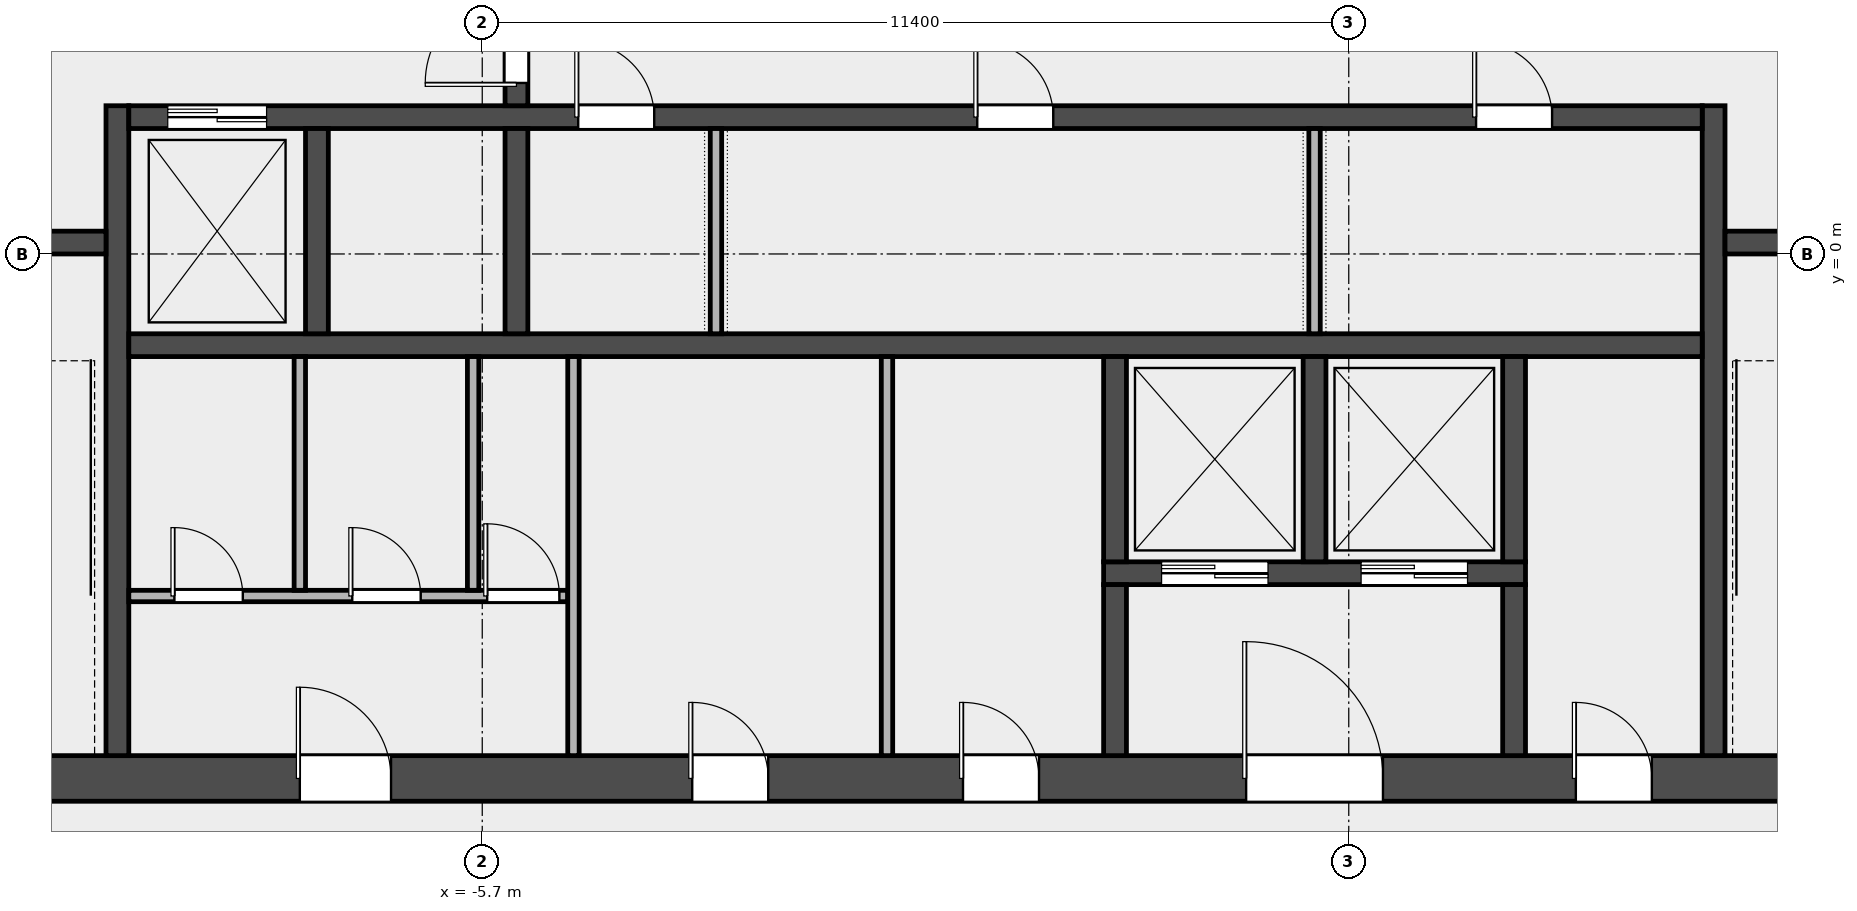
"""IFC4 building model, lengths in metres.
Left out: names, types, materials, properties, quantities, classifications, styles, units other than length and angle.
Written with IfcOpenShell. Run it as: python <this file> out.ifc"""

import sys

from ifc_helpers import new_model, si_unit, direction, frame, frame_2d, origin, place, context, subcontext, project, spatial, rectangle, extrude, element, fill, save


model = new_model("IFC4")
c1 = context("Model", 3, precision=1e-05, world=origin(), true_north=direction((0.0, 1.0)))
c2 = subcontext(c1, "Body", "Model", "MODEL_VIEW")
j1 = project(units=[si_unit("LENGTHUNIT", "METRE"), si_unit("PLANEANGLEUNIT", "RADIAN")], contexts=[c1])
p1 = place(None, origin())
s1 = spatial("IfcSite", under=j1, at=p1, CompositionType="ELEMENT")
p2 = place(p1, origin())
s2 = spatial("IfcBuilding", under=s1, at=p2, CompositionType="ELEMENT")
p3 = place(p2, frame((0.0, 0.0, 287.4)))
s3 = spatial("IfcBuildingStorey", under=s2, at=p3, CompositionType="ELEMENT", Elevation=287.4)
p4 = place(p3, frame((-14.4, -6.9, 0.0), z_axis=(0.0, 0.0, 1.0), x_axis=(1.0, 0.0, 0.0)))
e1 = element("IfcWall", 1, at=p4, inside=s3, PredefinedType="SHEAR", context=c2, shape_type="SweptSolid", body=[
    extrude(rectangle(XDim=28.8, YDim=0.6, at=frame_2d((14.4, 0.0))), origin(), (0.0, 0.0, 1.0), 3.7),
])
p5 = place(p4, frame((6.3, 0.0, 0.0)))
e2 = element("IfcOpeningElement", 2, at=p5, cuts=e1, PredefinedType="OPENING", context=c2, shape_type="SweptSolid", body=[
    extrude(rectangle(XDim=1.2, YDim=2.1, at=frame_2d((0.6, 1.05))), frame((0.0, 0.312, 0.0), z_axis=(0.0, -1.0, 0.0), x_axis=(1.0, 0.0, 0.0)), (0.0, 0.0, 1.0), 0.624),
])
p6 = place(p4, frame((11.462, 0.0, 0.0)))
e3 = element("IfcOpeningElement", 3, at=p6, cuts=e1, PredefinedType="OPENING", context=c2, shape_type="SweptSolid", body=[
    extrude(rectangle(XDim=1.0, YDim=2.1, at=frame_2d((0.5, 1.05))), frame((0.0, 0.312, 0.0), z_axis=(0.0, -1.0, 0.0), x_axis=(1.0, 0.0, 0.0)), (0.0, 0.0, 1.0), 0.624),
])
p7 = place(p4, frame((15.025, 0.0, 0.0)))
e4 = element("IfcOpeningElement", 4, at=p7, cuts=e1, PredefinedType="OPENING", context=c2, shape_type="SweptSolid", body=[
    extrude(rectangle(XDim=1.0, YDim=2.1, at=frame_2d((0.5, 1.05))), frame((0.0, 0.312, 0.0), z_axis=(0.0, -1.0, 0.0), x_axis=(1.0, 0.0, 0.0)), (0.0, 0.0, 1.0), 0.624),
])
p8 = place(p4, frame((18.75, 0.0, 0.0)))
e5 = element("IfcOpeningElement", 5, at=p8, cuts=e1, PredefinedType="OPENING", context=c2, shape_type="SweptSolid", body=[
    extrude(rectangle(XDim=1.8, YDim=2.1, at=frame_2d((0.9, 1.05))), frame((0.0, 0.312, 0.0), z_axis=(0.0, -1.0, 0.0), x_axis=(1.0, 0.0, 0.0)), (0.0, 0.0, 1.0), 0.624),
])
p9 = place(p4, frame((23.087, 0.0, 0.0)))
e6 = element("IfcOpeningElement", 6, at=p9, cuts=e1, PredefinedType="OPENING", context=c2, shape_type="SweptSolid", body=[
    extrude(rectangle(XDim=1.0, YDim=2.1, at=frame_2d((0.5, 1.05))), frame((0.0, 0.312, 0.0), z_axis=(0.0, -1.0, 0.0), x_axis=(1.0, 0.0, 0.0)), (0.0, 0.0, 1.0), 0.624),
])
for number, where, z_axis, x_axis in (
    (7, (-10.5, -6.6, 0.0), (0.0, 0.0, 1.0), (0.0, 1.0, 0.0)),
    (8, (10.5, -6.6, 0.0), (0.0, 0.0, 1.0), (0.0, 1.0, 0.0)),
):
    element("IfcWall", number, at=place(p3, frame(where, z_axis=z_axis, x_axis=x_axis)), inside=s3, PredefinedType="SHEAR", context=c2, shape_type="SweptSolid", body=[
        extrude(rectangle(XDim=8.55, YDim=0.3, at=frame_2d((4.275, 0.0))), origin(), (0.0, 0.0, 1.0), 3.7),
    ])
p10 = place(p3, frame((-13.8, 0.15, 0.0), z_axis=(0.0, 0.0, 1.0), x_axis=(1.0, 0.0, 0.0)))
e9 = element("IfcWall", 9, at=p10, inside=s3, PredefinedType="SOLIDWALL", context=c2, shape_type="SweptSolid", body=[
    extrude(rectangle(XDim=3.15, YDim=0.3, at=frame_2d((1.575, 0.0))), origin(), (0.0, 0.0, 1.0), 3.7),
])
p11 = place(p10, frame((0.975, 0.0, 0.0)))
e10 = element("IfcOpeningElement", 10, at=p11, cuts=e9, PredefinedType="OPENING", context=c2, shape_type="SweptSolid", body=[
    extrude(rectangle(XDim=1.1, YDim=2.1, at=frame_2d((0.55, 1.05))), frame((0.0, 0.162, 0.0), z_axis=(0.0, -1.0, 0.0), x_axis=(1.0, 0.0, 0.0)), (0.0, 0.0, 1.0), 0.324),
])
p12 = place(p3, frame((10.65, 0.15, 0.0), z_axis=(0.0, 0.0, 1.0), x_axis=(1.0, 0.0, 0.0)))
e11 = element("IfcWall", 11, at=p12, inside=s3, PredefinedType="SOLIDWALL", context=c2, shape_type="SweptSolid", body=[
    extrude(rectangle(XDim=3.15, YDim=0.3, at=frame_2d((1.575, 0.0))), origin(), (0.0, 0.0, 1.0), 3.7),
])
p13 = place(p12, frame((1.025, 0.0, 0.0)))
e12 = element("IfcOpeningElement", 12, at=p13, cuts=e11, PredefinedType="OPENING", context=c2, shape_type="SweptSolid", body=[
    extrude(rectangle(XDim=1.1, YDim=2.1, at=frame_2d((0.55, 1.05))), frame((0.0, 0.162, 0.0), z_axis=(0.0, -1.0, 0.0), x_axis=(1.0, 0.0, 0.0)), (0.0, 0.0, 1.0), 0.324),
])
p14 = place(p3, frame((-10.35, -1.2, 0.0), z_axis=(0.0, 0.0, 1.0), x_axis=(1.0, 0.0, 0.0)))
e13 = element("IfcWall", 13, at=p14, inside=s3, PredefinedType="SOLIDWALL", context=c2, shape_type="SweptSolid", body=[
    extrude(rectangle(XDim=20.7, YDim=0.3, at=frame_2d((10.35, 0.0))), origin(), (0.0, 0.0, 1.0), 3.7),
])
p15 = place(p3, frame((-10.35, 1.8, 0.0), z_axis=(0.0, 0.0, 1.0), x_axis=(1.0, 0.0, 0.0)))
e14 = element("IfcWall", 14, at=p15, inside=s3, PredefinedType="SOLIDWALL", context=c2, shape_type="SweptSolid", body=[
    extrude(rectangle(XDim=20.7, YDim=0.3, at=frame_2d((10.35, 0.0))), origin(), (0.0, 0.0, 1.0), 3.7),
])
p16 = place(p15, frame((0.512, 0.0, 0.0)))
e15 = element("IfcOpeningElement", 15, at=p16, cuts=e14, PredefinedType="OPENING", context=c2, shape_type="SweptSolid", body=[
    extrude(rectangle(XDim=1.3, YDim=2.1, at=frame_2d((0.65, 1.05))), frame((0.0, 0.162, 0.0), z_axis=(0.0, -1.0, 0.0), x_axis=(1.0, 0.0, 0.0)), (0.0, 0.0, 1.0), 0.324),
])
p17 = place(p15, frame((5.913, 0.0, 0.0)))
e16 = element("IfcOpeningElement", 16, at=p17, cuts=e14, PredefinedType="OPENING", context=c2, shape_type="SweptSolid", body=[
    extrude(rectangle(XDim=1.0, YDim=2.1, at=frame_2d((0.5, 1.05))), frame((0.0, 0.162, 0.0), z_axis=(0.0, -1.0, 0.0), x_axis=(1.0, 0.0, 0.0)), (0.0, 0.0, 1.0), 0.324),
])
p18 = place(p15, frame((11.163, 0.0, 0.0)))
e17 = element("IfcOpeningElement", 17, at=p18, cuts=e14, PredefinedType="OPENING", context=c2, shape_type="SweptSolid", body=[
    extrude(rectangle(XDim=1.0, YDim=2.1, at=frame_2d((0.5, 1.05))), frame((0.0, 0.162, 0.0), z_axis=(0.0, -1.0, 0.0), x_axis=(1.0, 0.0, 0.0)), (0.0, 0.0, 1.0), 0.324),
])
p19 = place(p15, frame((17.725, 0.0, 0.0)))
e18 = element("IfcOpeningElement", 18, at=p19, cuts=e14, PredefinedType="OPENING", context=c2, shape_type="SweptSolid", body=[
    extrude(rectangle(XDim=1.0, YDim=2.1, at=frame_2d((0.5, 1.05))), frame((0.0, 0.162, 0.0), z_axis=(0.0, -1.0, 0.0), x_axis=(1.0, 0.0, 0.0)), (0.0, 0.0, 1.0), 0.324),
])
for number, where, z_axis, x_axis in (
    (19, (-7.875, -1.05, 0.0), (0.0, 0.0, 1.0), (0.0, 1.0, 0.0)),
    (20, (-5.25, -1.05, 0.0), (0.0, 0.0, 1.0), (0.0, 1.0, 0.0)),
):
    element("IfcWall", number, at=place(p3, frame(where, z_axis=z_axis, x_axis=x_axis)), inside=s3, PredefinedType="SOLIDWALL", context=c2, shape_type="SweptSolid", body=[
        extrude(rectangle(XDim=2.7, YDim=0.3, at=frame_2d((1.35, 0.0))), origin(), (0.0, 0.0, 1.0), 3.7),
    ])
p20 = place(p3, frame((-5.25, 1.95, 0.0), z_axis=(0.0, 0.0, 1.0), x_axis=(0.0, 1.0, 0.0)))
e21 = element("IfcWall", 21, at=p20, inside=s3, PredefinedType="SOLIDWALL", context=c2, shape_type="SweptSolid", body=[
    extrude(rectangle(XDim=3.3, YDim=0.3, at=frame_2d((1.65, 0.0))), origin(), (0.0, 0.0, 1.0), 3.7),
])
p21 = place(p20, frame((0.3, 0.0, 0.0)))
e22 = element("IfcOpeningElement", 22, at=p21, cuts=e21, PredefinedType="OPENING", context=c2, shape_type="SweptSolid", body=[
    extrude(rectangle(XDim=1.2, YDim=2.1, at=frame_2d((0.6, 1.05))), frame((0.0, 0.162, 0.0), z_axis=(0.0, -1.0, 0.0), x_axis=(1.0, 0.0, 0.0)), (0.0, 0.0, 1.0), 0.324),
])
p22 = place(p20, frame((1.8, 0.0, 0.0)))
e23 = element("IfcOpeningElement", 23, at=p22, cuts=e21, PredefinedType="OPENING", context=c2, shape_type="SweptSolid", body=[
    extrude(rectangle(XDim=1.2, YDim=2.1, at=frame_2d((0.6, 1.05))), frame((0.0, 0.162, 0.0), z_axis=(0.0, -1.0, 0.0), x_axis=(1.0, 0.0, 0.0)), (0.0, 0.0, 1.0), 0.324),
])
p23 = place(p3, frame((2.475, -4.2, 0.0), z_axis=(0.0, 0.0, 1.0), x_axis=(1.0, 0.0, 0.0)))
e24 = element("IfcWall", 24, at=p23, inside=s3, PredefinedType="SOLIDWALL", context=c2, shape_type="SweptSolid", body=[
    extrude(rectangle(XDim=5.55, YDim=0.3, at=frame_2d((2.775, 0.0))), origin(), (0.0, 0.0, 1.0), 3.7),
])
p24 = place(p23, frame((0.762, 0.0, 0.0)))
e25 = element("IfcOpeningElement", 25, at=p24, cuts=e24, PredefinedType="OPENING", context=c2, shape_type="SweptSolid", body=[
    extrude(rectangle(XDim=1.4, YDim=2.1, at=frame_2d((0.7, 1.05))), frame((0.0, 0.162, 0.0), z_axis=(0.0, -1.0, 0.0), x_axis=(1.0, 0.0, 0.0)), (0.0, 0.0, 1.0), 0.324),
])
p25 = place(p23, frame((3.387, 0.0, 0.0)))
e26 = element("IfcOpeningElement", 26, at=p25, cuts=e24, PredefinedType="OPENING", context=c2, shape_type="SweptSolid", body=[
    extrude(rectangle(XDim=1.4, YDim=2.1, at=frame_2d((0.7, 1.05))), frame((0.0, 0.162, 0.0), z_axis=(0.0, -1.0, 0.0), x_axis=(1.0, 0.0, 0.0)), (0.0, 0.0, 1.0), 0.324),
])
p26 = place(p3, frame((2.625, -4.05, 0.0), z_axis=(0.0, 0.0, 1.0), x_axis=(0.0, 1.0, 0.0)))
e27 = element("IfcWall", 27, at=p26, inside=s3, PredefinedType="SOLIDWALL", context=c2, shape_type="SweptSolid", body=[
    extrude(rectangle(XDim=2.7, YDim=0.3, at=frame_2d((1.35, 0.0))), origin(), (0.0, 0.0, 1.0), 3.7),
])
p27 = place(p3, frame((2.625, -6.6, 0.0), z_axis=(0.0, 0.0, 1.0), x_axis=(0.0, 1.0, 0.0)))
e28 = element("IfcWall", 28, at=p27, inside=s3, PredefinedType="SOLIDWALL", context=c2, shape_type="SweptSolid", body=[
    extrude(rectangle(XDim=2.25, YDim=0.3, at=frame_2d((1.125, 0.0))), origin(), (0.0, 0.0, 1.0), 3.7),
])
for number, where, z_axis, x_axis in (
    (29, (5.25, -4.05, 0.0), (0.0, 0.0, 1.0), (0.0, 1.0, 0.0)),
    (30, (7.875, -4.05, 0.0), (0.0, 0.0, 1.0), (0.0, 1.0, 0.0)),
):
    element("IfcWall", number, at=place(p3, frame(where, z_axis=z_axis, x_axis=x_axis)), inside=s3, PredefinedType="SOLIDWALL", context=c2, shape_type="SweptSolid", body=[
        extrude(rectangle(XDim=2.7, YDim=0.3, at=frame_2d((1.35, 0.0))), origin(), (0.0, 0.0, 1.0), 3.7),
    ])
p28 = place(p3, frame((7.875, -6.6, 0.0), z_axis=(0.0, 0.0, 1.0), x_axis=(0.0, 1.0, 0.0)))
e31 = element("IfcWall", 31, at=p28, inside=s3, PredefinedType="SOLIDWALL", context=c2, shape_type="SweptSolid", body=[
    extrude(rectangle(XDim=2.25, YDim=0.3, at=frame_2d((1.125, 0.0))), origin(), (0.0, 0.0, 1.0), 3.7),
])
p29 = place(p3, frame((-10.35, -4.5, 0.0), z_axis=(0.0, 0.0, 1.0), x_axis=(1.0, 0.0, 0.0)))
e32 = element("IfcWall", 32, at=p29, inside=s3, PredefinedType="PARTITIONING", context=c2, shape_type="SweptSolid", body=[
    extrude(rectangle(XDim=5.775, YDim=0.15, at=frame_2d((2.888, 0.0))), origin(), (0.0, 0.0, 1.0), 3.7),
])
p30 = place(p29, frame((0.6, 0.0, 0.0)))
e33 = element("IfcOpeningElement", 33, at=p30, cuts=e32, PredefinedType="OPENING", context=c2, shape_type="SweptSolid", body=[
    extrude(rectangle(XDim=0.9, YDim=2.1, at=frame_2d((0.45, 1.05))), frame((0.0, 0.087, 0.0), z_axis=(0.0, -1.0, 0.0), x_axis=(1.0, 0.0, 0.0)), (0.0, 0.0, 1.0), 0.174),
])
p31 = place(p29, frame((2.94, 0.0, 0.0)))
e34 = element("IfcOpeningElement", 34, at=p31, cuts=e32, PredefinedType="OPENING", context=c2, shape_type="SweptSolid", body=[
    extrude(rectangle(XDim=0.9, YDim=2.1, at=frame_2d((0.45, 1.05))), frame((0.0, 0.087, 0.0), z_axis=(0.0, -1.0, 0.0), x_axis=(1.0, 0.0, 0.0)), (0.0, 0.0, 1.0), 0.174),
])
p32 = place(p29, frame((4.715, 0.0, 0.0)))
e35 = element("IfcOpeningElement", 35, at=p32, cuts=e32, PredefinedType="OPENING", context=c2, shape_type="SweptSolid", body=[
    extrude(rectangle(XDim=0.95, YDim=2.1, at=frame_2d((0.475, 1.05))), frame((0.0, 0.087, 0.0), z_axis=(0.0, -1.0, 0.0), x_axis=(1.0, 0.0, 0.0)), (0.0, 0.0, 1.0), 0.174),
])
for number, where, z_axis, x_axis in (
    (36, (-8.1, -4.425, 0.0), (0.0, 0.0, 1.0), (0.0, 1.0, 0.0)),
    (37, (-5.82, -4.425, 0.0), (0.0, 0.0, 1.0), (0.0, 1.0, 0.0)),
):
    element("IfcWall", number, at=place(p3, frame(where, z_axis=z_axis, x_axis=x_axis)), inside=s3, PredefinedType="PARTITIONING", context=c2, shape_type="SweptSolid", body=[
        extrude(rectangle(XDim=3.075, YDim=0.15, at=frame_2d((1.538, 0.0))), origin(), (0.0, 0.0, 1.0), 3.7),
    ])
for number, where, z_axis, x_axis in (
    (38, (-4.5, -6.6, 0.0), (0.0, 0.0, 1.0), (0.0, 1.0, 0.0)),
    (39, (-0.375, -6.6, 0.0), (0.0, 0.0, 1.0), (0.0, 1.0, 0.0)),
):
    element("IfcWall", number, at=place(p3, frame(where, z_axis=z_axis, x_axis=x_axis)), inside=s3, PredefinedType="PARTITIONING", context=c2, shape_type="SweptSolid", body=[
        extrude(rectangle(XDim=5.25, YDim=0.15, at=frame_2d((2.625, 0.0))), origin(), (0.0, 0.0, 1.0), 3.7),
    ])
for number, where, z_axis, x_axis in (
    (40, (-2.625, -1.05, 0.0), (0.0, 0.0, 1.0), (0.0, 1.0, 0.0)),
    (41, (5.25, -1.05, 0.0), (0.0, 0.0, 1.0), (0.0, 1.0, 0.0)),
):
    element("IfcWall", number, at=place(p3, frame(where, z_axis=z_axis, x_axis=x_axis)), inside=s3, PredefinedType="PARTITIONING", context=c2, shape_type="SweptSolid", body=[
        extrude(rectangle(XDim=2.7, YDim=0.15, at=frame_2d((1.35, 0.0))), origin(), (0.0, 0.0, 1.0), 3.7),
    ])
p33 = place(p21, origin())
e42 = element("IfcDoor", 42, at=p33, inside=s3, OperationType="SINGLE_SWING_LEFT", PredefinedType="DOOR", context=c2, shape_type="SweptSolid", body=[
    extrude(rectangle(XDim=1.2, YDim=2.1, at=frame_2d((0.6, 1.05))), frame((0.0, 0.025, 0.0), z_axis=(0.0, -1.0, 0.0), x_axis=(1.0, 0.0, 0.0)), (0.0, 0.0, 1.0), 0.05),
])
fill(e22, e42)
p34 = place(p16, origin())
e43 = element("IfcDoor", 43, at=p34, inside=s3, OperationType="DOUBLE_DOOR_SLIDING", PredefinedType="DOOR", context=c2, shape_type="SweptSolid", body=[
    extrude(rectangle(XDim=1.3, YDim=2.1, at=frame_2d((0.65, 1.05))), frame((0.0, 0.025, 0.0), z_axis=(0.0, -1.0, 0.0), x_axis=(1.0, 0.0, 0.0)), (0.0, 0.0, 1.0), 0.05),
])
fill(e15, e43)
p35 = place(p24, origin())
e44 = element("IfcDoor", 44, at=p35, inside=s3, OperationType="DOUBLE_DOOR_SLIDING", PredefinedType="DOOR", context=c2, shape_type="SweptSolid", body=[
    extrude(rectangle(XDim=1.4, YDim=2.1, at=frame_2d((0.7, 1.05))), frame((0.0, 0.025, 0.0), z_axis=(0.0, -1.0, 0.0), x_axis=(1.0, 0.0, 0.0)), (0.0, 0.0, 1.0), 0.05),
])
fill(e25, e44)
p36 = place(p25, origin())
e45 = element("IfcDoor", 45, at=p36, inside=s3, OperationType="DOUBLE_DOOR_SLIDING", PredefinedType="DOOR", context=c2, shape_type="SweptSolid", body=[
    extrude(rectangle(XDim=1.4, YDim=2.1, at=frame_2d((0.7, 1.05))), frame((0.0, 0.025, 0.0), z_axis=(0.0, -1.0, 0.0), x_axis=(1.0, 0.0, 0.0)), (0.0, 0.0, 1.0), 0.05),
])
fill(e26, e45)
p37 = place(p5, origin())
e46 = element("IfcDoor", 46, at=p37, inside=s3, OperationType="SINGLE_SWING_LEFT", PredefinedType="DOOR", context=c2, shape_type="SweptSolid", body=[
    extrude(rectangle(XDim=1.2, YDim=2.1, at=frame_2d((0.6, 1.05))), frame((0.0, 0.025, 0.0), z_axis=(0.0, -1.0, 0.0), x_axis=(1.0, 0.0, 0.0)), (0.0, 0.0, 1.0), 0.05),
])
fill(e2, e46)
p38 = place(p30, origin())
e47 = element("IfcDoor", 47, at=p38, inside=s3, OperationType="SINGLE_SWING_LEFT", PredefinedType="DOOR", context=c2, shape_type="SweptSolid", body=[
    extrude(rectangle(XDim=0.9, YDim=2.1, at=frame_2d((0.45, 1.05))), frame((0.0, 0.025, 0.0), z_axis=(0.0, -1.0, 0.0), x_axis=(1.0, 0.0, 0.0)), (0.0, 0.0, 1.0), 0.05),
])
fill(e33, e47)
p39 = place(p31, origin())
e48 = element("IfcDoor", 48, at=p39, inside=s3, OperationType="SINGLE_SWING_LEFT", PredefinedType="DOOR", context=c2, shape_type="SweptSolid", body=[
    extrude(rectangle(XDim=0.9, YDim=2.1, at=frame_2d((0.45, 1.05))), frame((0.0, 0.025, 0.0), z_axis=(0.0, -1.0, 0.0), x_axis=(1.0, 0.0, 0.0)), (0.0, 0.0, 1.0), 0.05),
])
fill(e34, e48)
p40 = place(p32, origin())
e49 = element("IfcDoor", 49, at=p40, inside=s3, OperationType="SINGLE_SWING_LEFT", PredefinedType="DOOR", context=c2, shape_type="SweptSolid", body=[
    extrude(rectangle(XDim=0.95, YDim=2.1, at=frame_2d((0.475, 1.05))), frame((0.0, 0.025, 0.0), z_axis=(0.0, -1.0, 0.0), x_axis=(1.0, 0.0, 0.0)), (0.0, 0.0, 1.0), 0.05),
])
fill(e35, e49)
p41 = place(p6, origin())
e50 = element("IfcDoor", 50, at=p41, inside=s3, OperationType="SINGLE_SWING_LEFT", PredefinedType="DOOR", context=c2, shape_type="SweptSolid", body=[
    extrude(rectangle(XDim=1.0, YDim=2.1, at=frame_2d((0.5, 1.05))), frame((0.0, 0.025, 0.0), z_axis=(0.0, -1.0, 0.0), x_axis=(1.0, 0.0, 0.0)), (0.0, 0.0, 1.0), 0.05),
])
fill(e3, e50)
p42 = place(p7, origin())
e51 = element("IfcDoor", 51, at=p42, inside=s3, OperationType="SINGLE_SWING_LEFT", PredefinedType="DOOR", context=c2, shape_type="SweptSolid", body=[
    extrude(rectangle(XDim=1.0, YDim=2.1, at=frame_2d((0.5, 1.05))), frame((0.0, 0.025, 0.0), z_axis=(0.0, -1.0, 0.0), x_axis=(1.0, 0.0, 0.0)), (0.0, 0.0, 1.0), 0.05),
])
fill(e4, e51)
p43 = place(p8, origin())
e52 = element("IfcDoor", 52, at=p43, inside=s3, OperationType="DOUBLE_DOOR_SINGLE_SWING", PredefinedType="DOOR", context=c2, shape_type="SweptSolid", body=[
    extrude(rectangle(XDim=1.8, YDim=2.1, at=frame_2d((0.9, 1.05))), frame((0.0, 0.025, 0.0), z_axis=(0.0, -1.0, 0.0), x_axis=(1.0, 0.0, 0.0)), (0.0, 0.0, 1.0), 0.05),
])
fill(e5, e52)
p44 = place(p9, origin())
e53 = element("IfcDoor", 53, at=p44, inside=s3, OperationType="SINGLE_SWING_LEFT", PredefinedType="DOOR", context=c2, shape_type="SweptSolid", body=[
    extrude(rectangle(XDim=1.0, YDim=2.1, at=frame_2d((0.5, 1.05))), frame((0.0, 0.025, 0.0), z_axis=(0.0, -1.0, 0.0), x_axis=(1.0, 0.0, 0.0)), (0.0, 0.0, 1.0), 0.05),
])
fill(e6, e53)
p45 = place(p17, origin())
e54 = element("IfcDoor", 54, at=p45, inside=s3, OperationType="SINGLE_SWING_LEFT", PredefinedType="DOOR", context=c2, shape_type="SweptSolid", body=[
    extrude(rectangle(XDim=1.0, YDim=2.1, at=frame_2d((0.5, 1.05))), frame((0.0, 0.025, 0.0), z_axis=(0.0, -1.0, 0.0), x_axis=(1.0, 0.0, 0.0)), (0.0, 0.0, 1.0), 0.05),
])
fill(e16, e54)
p46 = place(p18, origin())
e55 = element("IfcDoor", 55, at=p46, inside=s3, OperationType="SINGLE_SWING_LEFT", PredefinedType="DOOR", context=c2, shape_type="SweptSolid", body=[
    extrude(rectangle(XDim=1.0, YDim=2.1, at=frame_2d((0.5, 1.05))), frame((0.0, 0.025, 0.0), z_axis=(0.0, -1.0, 0.0), x_axis=(1.0, 0.0, 0.0)), (0.0, 0.0, 1.0), 0.05),
])
fill(e17, e55)
p47 = place(p19, origin())
e56 = element("IfcDoor", 56, at=p47, inside=s3, OperationType="SINGLE_SWING_LEFT", PredefinedType="DOOR", context=c2, shape_type="SweptSolid", body=[
    extrude(rectangle(XDim=1.0, YDim=2.1, at=frame_2d((0.5, 1.05))), frame((0.0, 0.025, 0.0), z_axis=(0.0, -1.0, 0.0), x_axis=(1.0, 0.0, 0.0)), (0.0, 0.0, 1.0), 0.05),
])
fill(e18, e56)
save(model, sys.argv[1])
